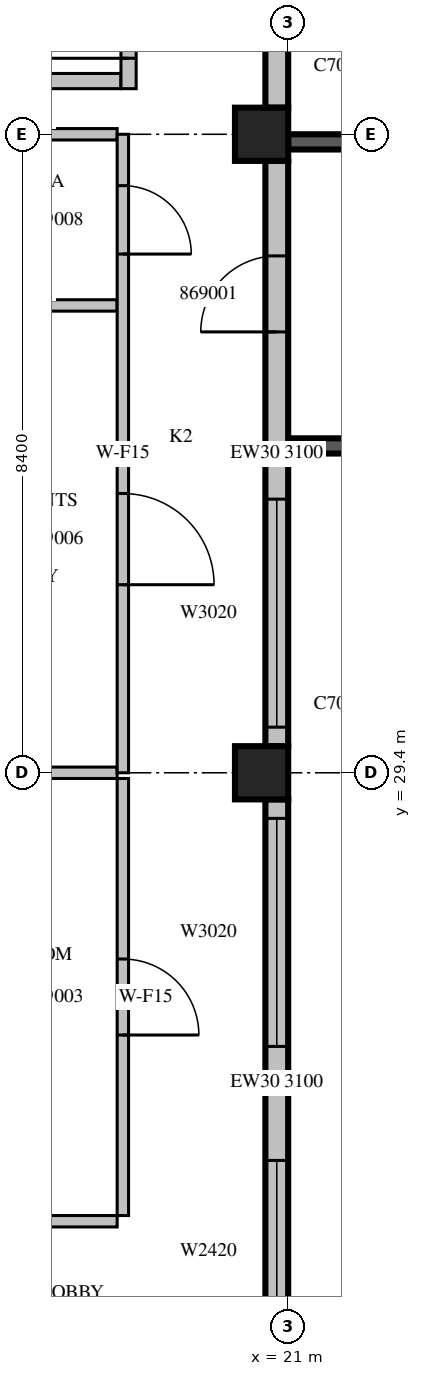
"""IFC4 building model, lengths in metres.
Left out: names, types, materials, properties, quantities, classifications, styles, units other than length and angle.
Written with IfcOpenShell. Run it as: python <this file> out.ifc"""

import sys

from ifc_helpers import new_model, si_unit, direction, frame, frame_2d, origin, origin_2d, place, context, subcontext, project, spatial, rectangle, extrude, source, transform, mapped, element, fill, save


model = new_model("IFC4")
c1 = context("Model", 3, precision=1e-05, world=origin(), true_north=direction((0.0, 1.0)))
c2 = subcontext(c1, "Body", "Model", "MODEL_VIEW")
j1 = project(units=[si_unit("LENGTHUNIT", "METRE"), si_unit("PLANEANGLEUNIT", "RADIAN")], contexts=[c1])
p1 = place(None, origin())
s1 = spatial("IfcSite", under=j1, at=p1, CompositionType="ELEMENT")
p2 = place(p1, origin())
s2 = spatial("IfcBuilding", under=s1, at=p2, CompositionType="ELEMENT")
p3 = place(p2, frame((0.0, 0.0, 302.0)))
s3 = spatial("IfcBuildingStorey", under=s2, at=p3, CompositionType="ELEMENT", Elevation=302.0)
m1 = source(origin(), c2, "Body", "SweptSolid", [
    extrude(rectangle(XDim=0.7, YDim=0.7, at=origin_2d()), origin(), (0.0, 0.0, 1.0), 3.5),
])
for number, where, z_axis, x_axis in (
    (1, (20.65, 29.4, 0.0), (0.0, 0.0, 1.0), (1.0, 0.0, 0.0)),
    (2, (20.65, 37.8, 0.0), (0.0, 0.0, 1.0), (1.0, 0.0, 0.0)),
):
    element("IfcColumn", number, at=place(p3, frame(where, z_axis=z_axis, x_axis=x_axis)), inside=s3, PredefinedType="COLUMN", context=c2, shape_type="MappedRepresentation", body=[
        mapped(m1, transform((0.0, 0.0, 0.0), scale=1.0)),
    ])
m2 = source(origin(), c2, "Body", "SweptSolid", [
    extrude(rectangle(XDim=3.9, YDim=0.2, at=frame_2d((1.95, 0.0))), origin(), (0.0, 0.0, 1.0), 3.1),
])
p4 = place(p3, frame((21.0, 33.7, 0.0), z_axis=(0.0, 0.0, 1.0), x_axis=(1.0, 0.0, 0.0)))
e3 = element("IfcWall", 3, at=p4, inside=s3, PredefinedType="SOLIDWALL", context=c2, shape_type="MappedRepresentation", body=[
    mapped(m2, transform((0.0, 0.0, 0.0), scale=1.0)),
])
m3 = source(origin(), c2, "Body", "SweptSolid", [
    extrude(rectangle(XDim=2.4, YDim=2.0, at=frame_2d((1.2, 1.0))), frame((0.0, 0.11, 0.0), z_axis=(0.0, -1.0, 0.0), x_axis=(1.0, 0.0, 0.0)), (0.0, 0.0, 1.0), 0.22),
])
p5 = place(p4, frame((0.75, 0.0, 0.6)))
e4 = element("IfcOpeningElement", 4, at=p5, cuts=e3, PredefinedType="OPENING", context=c2, shape_type="MappedRepresentation", body=[
    mapped(m3, transform((0.0, 0.0, 0.0), scale=1.0)),
])
p6 = place(p3, frame((21.0, 37.7, 0.0), z_axis=(0.0, 0.0, 1.0), x_axis=(1.0, 0.0, 0.0)))
e5 = element("IfcWall", 5, at=p6, inside=s3, PredefinedType="SOLIDWALL", context=c2, shape_type="MappedRepresentation", body=[
    mapped(m2, transform((0.0, 0.0, 0.0), scale=1.0)),
])
p7 = place(p6, frame((0.75, 0.0, 0.6)))
e6 = element("IfcOpeningElement", 6, at=p7, cuts=e5, PredefinedType="OPENING", context=c2, shape_type="MappedRepresentation", body=[
    mapped(m3, transform((0.0, 0.0, 0.0), scale=1.0)),
])
m4 = source(origin(), c2, "Body", "SweptSolid", [
    extrude(rectangle(XDim=7.45, YDim=0.3, at=frame_2d((3.725, 0.0))), origin(), (0.0, 0.0, 1.0), 3.1),
])
p8 = place(p3, frame((20.85, 21.6, 0.0), z_axis=(0.0, 0.0, 1.0), x_axis=(0.0, 1.0, 0.0)))
e7 = element("IfcWall", 7, at=p8, inside=s3, PredefinedType="STANDARD", context=c2, shape_type="MappedRepresentation", body=[
    mapped(m4, transform((0.0, 0.0, 0.0), scale=1.0)),
])
m5 = source(origin(), c2, "Body", "SweptSolid", [
    extrude(rectangle(XDim=2.4, YDim=2.0, at=frame_2d((1.2, 1.0))), frame((0.0, 0.16, 0.0), z_axis=(0.0, -1.0, 0.0), x_axis=(1.0, 0.0, 0.0)), (0.0, 0.0, 1.0), 0.32),
])
p9 = place(p8, frame((0.3, 0.0, 0.6)))
e8 = element("IfcOpeningElement", 8, at=p9, cuts=e7, PredefinedType="OPENING", context=c2, shape_type="MappedRepresentation", body=[
    mapped(m5, transform((0.0, 0.0, 0.0), scale=1.0)),
])
m6 = source(origin(), c2, "Body", "SweptSolid", [
    extrude(rectangle(XDim=3.0, YDim=2.0, at=frame_2d((1.5, 1.0))), frame((0.0, 0.16, 0.0), z_axis=(0.0, -1.0, 0.0), x_axis=(1.0, 0.0, 0.0)), (0.0, 0.0, 1.0), 0.32),
])
p10 = place(p8, frame((4.2, 0.0, 0.6)))
e9 = element("IfcOpeningElement", 9, at=p10, cuts=e7, PredefinedType="OPENING", context=c2, shape_type="MappedRepresentation", body=[
    mapped(m6, transform((0.0, 0.0, 0.0), scale=1.0)),
])
m7 = source(origin(), c2, "Body", "SweptSolid", [
    extrude(rectangle(XDim=7.7, YDim=0.3, at=frame_2d((3.85, 0.0))), origin(), (0.0, 0.0, 1.0), 3.1),
])
p11 = place(p3, frame((20.85, 29.75, 0.0), z_axis=(0.0, 0.0, 1.0), x_axis=(0.0, 1.0, 0.0)))
e10 = element("IfcWall", 10, at=p11, inside=s3, PredefinedType="STANDARD", context=c2, shape_type="MappedRepresentation", body=[
    mapped(m7, transform((0.0, 0.0, 0.0), scale=1.0)),
])
p12 = place(p11, frame((0.25, 0.0, 0.6)))
e11 = element("IfcOpeningElement", 11, at=p12, cuts=e10, PredefinedType="OPENING", context=c2, shape_type="MappedRepresentation", body=[
    mapped(m6, transform((0.0, 0.0, 0.0), scale=1.0)),
])
m8 = source(origin(), c2, "Body", "SweptSolid", [
    extrude(rectangle(XDim=1.0, YDim=2.1, at=frame_2d((0.5, 1.05))), frame((0.0, 0.16, 0.0), z_axis=(0.0, -1.0, 0.0), x_axis=(1.0, 0.0, 0.0)), (0.0, 0.0, 1.0), 0.32),
])
p13 = place(p11, frame((5.45, 0.0, 0.0)))
e12 = element("IfcOpeningElement", 12, at=p13, cuts=e10, PredefinedType="OPENING", context=c2, shape_type="MappedRepresentation", body=[
    mapped(m8, transform((0.0, 0.0, 0.0), scale=1.0)),
])
m9 = source(origin(), c2, "Body", "SweptSolid", [
    extrude(rectangle(XDim=5.53, YDim=0.3, at=frame_2d((2.765, 0.0))), origin(), (0.0, 0.0, 1.0), 3.1),
])
p14 = place(p3, frame((20.85, 38.15, 0.0), z_axis=(0.0, 0.0, 1.0), x_axis=(0.0, 1.0, 0.0)))
e13 = element("IfcWall", 13, at=p14, inside=s3, PredefinedType="STANDARD", context=c2, shape_type="MappedRepresentation", body=[
    mapped(m9, transform((0.0, 0.0, 0.0), scale=1.0)),
])
m10 = source(origin(), c2, "Body", "SweptSolid", [
    extrude(rectangle(XDim=3.6, YDim=2.0, at=frame_2d((1.8, 1.0))), frame((0.0, 0.16, 0.0), z_axis=(0.0, -1.0, 0.0), x_axis=(1.0, 0.0, 0.0)), (0.0, 0.0, 1.0), 0.32),
])
p15 = place(p14, frame((0.79, 0.0, 0.6)))
e14 = element("IfcOpeningElement", 14, at=p15, cuts=e13, PredefinedType="OPENING", context=c2, shape_type="MappedRepresentation", body=[
    mapped(m10, transform((0.0, 0.0, 0.0), scale=1.0)),
])
m11 = source(origin(), c2, "Body", "SweptSolid", [
    extrude(rectangle(XDim=8.0, YDim=0.2, at=frame_2d((4.0, 0.0))), origin(), (0.0, 0.0, 1.0), 3.1),
])
p16 = place(p3, frame((10.8, 38.5, 0.0), z_axis=(0.0, 0.0, 1.0), x_axis=(1.0, 0.0, 0.0)))
e15 = element("IfcWall", 15, at=p16, inside=s3, PredefinedType="PARTITIONING", context=c2, shape_type="MappedRepresentation", body=[
    mapped(m11, transform((0.0, 0.0, 0.0), scale=1.0)),
])
m12 = source(origin(), c2, "Body", "SweptSolid", [
    extrude(rectangle(XDim=5.45, YDim=0.2, at=frame_2d((2.725, 0.0))), origin(), (0.0, 0.0, 1.0), 3.1),
])
p17 = place(p3, frame((18.9, 38.4, 0.0), z_axis=(0.0, 0.0, 1.0), x_axis=(0.0, 1.0, 0.0)))
e16 = element("IfcWall", 16, at=p17, inside=s3, PredefinedType="PARTITIONING", context=c2, shape_type="MappedRepresentation", body=[
    mapped(m12, transform((0.0, 0.0, 0.0), scale=1.0)),
])
m13 = source(origin(), c2, "Body", "SweptSolid", [
    extrude(rectangle(XDim=1.2, YDim=2.1, at=frame_2d((0.6, 1.05))), frame((0.0, 0.11, 0.0), z_axis=(0.0, -1.0, 0.0), x_axis=(1.0, 0.0, 0.0)), (0.0, 0.0, 1.0), 0.22),
])
p18 = place(p17, frame((0.4, 0.0, 0.0)))
e17 = element("IfcOpeningElement", 17, at=p18, cuts=e16, PredefinedType="OPENING", context=c2, shape_type="MappedRepresentation", body=[
    mapped(m13, transform((0.0, 0.0, 0.0), scale=1.0)),
])
m14 = source(origin(), c2, "Body", "SweptSolid", [
    extrude(rectangle(XDim=0.9, YDim=2.1, at=frame_2d((0.45, 1.05))), frame((0.0, 0.11, 0.0), z_axis=(0.0, -1.0, 0.0), x_axis=(1.0, 0.0, 0.0)), (0.0, 0.0, 1.0), 0.22),
])
p19 = place(p17, frame((3.25, 0.0, 0.0)))
e18 = element("IfcOpeningElement", 18, at=p19, cuts=e16, PredefinedType="OPENING", context=c2, shape_type="MappedRepresentation", body=[
    mapped(m14, transform((0.0, 0.0, 0.0), scale=1.0)),
])
m15 = source(origin(), c2, "Body", "SweptSolid", [
    extrude(rectangle(XDim=4.575, YDim=0.15, at=frame_2d((2.288, 0.0))), origin(), (0.0, 0.0, 1.0), 3.1),
])
for number, where, z_axis, x_axis in (
    (19, (14.175, 23.5, 0.0), (0.0, 0.0, 1.0), (1.0, 0.0, 0.0)),
    (20, (18.75, 29.4, 0.0), (0.0, 0.0, 1.0), (-1.0, 0.0, 0.0)),
):
    element("IfcWall", number, at=place(p3, frame(where, z_axis=z_axis, x_axis=x_axis)), inside=s3, PredefinedType="PARTITIONING", context=c2, shape_type="MappedRepresentation", body=[
        mapped(m15, transform((0.0, 0.0, 0.0), scale=1.0)),
    ])
m16 = source(origin(), c2, "Body", "SweptSolid", [
    extrude(rectangle(XDim=5.75, YDim=0.15, at=frame_2d((2.875, 0.0))), origin(), (0.0, 0.0, 1.0), 3.1),
])
p20 = place(p3, frame((18.825, 23.575, 0.0), z_axis=(0.0, 0.0, 1.0), x_axis=(0.0, 1.0, 0.0)))
e21 = element("IfcWall", 21, at=p20, inside=s3, PredefinedType="PARTITIONING", context=c2, shape_type="MappedRepresentation", body=[
    mapped(m16, transform((0.0, 0.0, 0.0), scale=1.0)),
])
m17 = source(origin(), c2, "Body", "SweptSolid", [
    extrude(rectangle(XDim=1.0, YDim=2.1, at=frame_2d((0.5, 1.05))), frame((0.0, 0.085, 0.0), z_axis=(0.0, -1.0, 0.0), x_axis=(1.0, 0.0, 0.0)), (0.0, 0.0, 1.0), 0.17),
])
p21 = place(p20, frame((2.375, 0.0, 0.0)))
e22 = element("IfcOpeningElement", 22, at=p21, cuts=e21, PredefinedType="OPENING", context=c2, shape_type="MappedRepresentation", body=[
    mapped(m17, transform((0.0, 0.0, 0.0), scale=1.0)),
])
m18 = source(origin(), c2, "Body", "SweptSolid", [
    extrude(rectangle(XDim=2.4, YDim=0.15, at=frame_2d((1.2, 0.0))), origin(), (0.0, 0.0, 1.0), 3.1),
])
for number, where, z_axis, x_axis in (
    (23, (18.75, 35.548, 0.0), (0.0, 0.0, 1.0), (-1.0, 0.0, 0.0)),
    (24, (18.75, 37.8, 0.0), (0.0, 0.0, 1.0), (-1.0, 0.0, 0.0)),
):
    element("IfcWall", number, at=place(p3, frame(where, z_axis=z_axis, x_axis=x_axis)), inside=s3, PredefinedType="PARTITIONING", context=c2, shape_type="MappedRepresentation", body=[
        mapped(m18, transform((0.0, 0.0, 0.0), scale=1.0)),
    ])
m19 = source(origin(), c2, "Body", "SweptSolid", [
    extrude(rectangle(XDim=8.4, YDim=0.15, at=frame_2d((4.2, 0.0))), origin(), (0.0, 0.0, 1.0), 3.1),
])
p22 = place(p3, frame((18.825, 29.4, 0.0), z_axis=(0.0, 0.0, 1.0), x_axis=(0.0, 1.0, 0.0)))
e25 = element("IfcWall", 25, at=p22, inside=s3, PredefinedType="PARTITIONING", context=c2, shape_type="MappedRepresentation", body=[
    mapped(m19, transform((0.0, 0.0, 0.0), scale=1.0)),
])
m20 = source(origin(), c2, "Body", "SweptSolid", [
    extrude(rectangle(XDim=1.2, YDim=2.1, at=frame_2d((0.6, 1.05))), frame((0.0, 0.085, 0.0), z_axis=(0.0, -1.0, 0.0), x_axis=(1.0, 0.0, 0.0)), (0.0, 0.0, 1.0), 0.17),
])
p23 = place(p22, frame((2.474, 0.0, 0.0)))
e26 = element("IfcOpeningElement", 26, at=p23, cuts=e25, PredefinedType="OPENING", context=c2, shape_type="MappedRepresentation", body=[
    mapped(m20, transform((0.0, 0.0, 0.0), scale=1.0)),
])
m21 = source(origin(), c2, "Body", "SweptSolid", [
    extrude(rectangle(XDim=0.9, YDim=2.1, at=frame_2d((0.45, 1.05))), frame((0.0, 0.085, 0.0), z_axis=(0.0, -1.0, 0.0), x_axis=(1.0, 0.0, 0.0)), (0.0, 0.0, 1.0), 0.17),
])
p24 = place(p22, frame((6.824, 0.0, 0.0)))
e27 = element("IfcOpeningElement", 27, at=p24, cuts=e25, PredefinedType="OPENING", context=c2, shape_type="MappedRepresentation", body=[
    mapped(m21, transform((0.0, 0.0, 0.0), scale=1.0)),
])
m22 = source(origin(), c2, "Body", "SweptSolid", [
    extrude(rectangle(XDim=2.4, YDim=2.0, at=frame_2d((1.2, 1.0))), frame((0.0, 0.03, 0.0), z_axis=(0.0, -1.0, 0.0), x_axis=(1.0, 0.0, 0.0)), (0.0, 0.0, 1.0), 0.06),
])
p25 = place(p9, origin())
e28 = element("IfcWindow", 28, at=p25, inside=s3, PartitioningType="SINGLE_PANEL", PredefinedType="WINDOW", context=c2, shape_type="MappedRepresentation", body=[
    mapped(m22, transform((0.0, 0.0, 0.0), scale=1.0)),
])
fill(e8, e28)
m23 = source(origin(), c2, "Body", "SweptSolid", [
    extrude(rectangle(XDim=3.0, YDim=2.0, at=frame_2d((1.5, 1.0))), frame((0.0, 0.03, 0.0), z_axis=(0.0, -1.0, 0.0), x_axis=(1.0, 0.0, 0.0)), (0.0, 0.0, 1.0), 0.06),
])
p26 = place(p10, origin())
e29 = element("IfcWindow", 29, at=p26, inside=s3, PartitioningType="SINGLE_PANEL", PredefinedType="WINDOW", context=c2, shape_type="MappedRepresentation", body=[
    mapped(m23, transform((0.0, 0.0, 0.0), scale=1.0)),
])
fill(e9, e29)
p27 = place(p12, origin())
e30 = element("IfcWindow", 30, at=p27, inside=s3, PartitioningType="SINGLE_PANEL", PredefinedType="WINDOW", context=c2, shape_type="MappedRepresentation", body=[
    mapped(m23, transform((0.0, 0.0, 0.0), scale=1.0)),
])
fill(e11, e30)
m24 = source(origin(), c2, "Body", "SweptSolid", [
    extrude(rectangle(XDim=1.2, YDim=2.1, at=frame_2d((0.6, 1.05))), frame((0.0, 0.025, 0.0), z_axis=(0.0, -1.0, 0.0), x_axis=(1.0, 0.0, 0.0)), (0.0, 0.0, 1.0), 0.05),
])
p28 = place(p18, origin())
e31 = element("IfcDoor", 31, at=p28, inside=s3, OperationType="SINGLE_SWING_LEFT", PredefinedType="DOOR", context=c2, shape_type="MappedRepresentation", body=[
    mapped(m24, transform((0.0, 0.0, 0.0), scale=1.0)),
])
fill(e17, e31)
m25 = source(origin(), c2, "Body", "SweptSolid", [
    extrude(rectangle(XDim=1.0, YDim=2.1, at=frame_2d((0.5, 1.05))), frame((0.0, 0.025, 0.0), z_axis=(0.0, -1.0, 0.0), x_axis=(1.0, 0.0, 0.0)), (0.0, 0.0, 1.0), 0.05),
])
p29 = place(p21, origin())
e32 = element("IfcDoor", 32, at=p29, inside=s3, OperationType="SINGLE_SWING_RIGHT", PredefinedType="DOOR", context=c2, shape_type="MappedRepresentation", body=[
    mapped(m25, transform((0.0, 0.0, 0.0), scale=1.0)),
])
fill(e22, e32)
p30 = place(p23, origin())
e33 = element("IfcDoor", 33, at=p30, inside=s3, OperationType="SINGLE_SWING_RIGHT", PredefinedType="DOOR", context=c2, shape_type="MappedRepresentation", body=[
    mapped(m24, transform((0.0, 0.0, 0.0), scale=1.0)),
])
fill(e26, e33)
m26 = source(origin(), c2, "Body", "SweptSolid", [
    extrude(rectangle(XDim=0.9, YDim=2.1, at=frame_2d((0.45, 1.05))), frame((0.0, 0.025, 0.0), z_axis=(0.0, -1.0, 0.0), x_axis=(1.0, 0.0, 0.0)), (0.0, 0.0, 1.0), 0.05),
])
p31 = place(p24, origin())
e34 = element("IfcDoor", 34, at=p31, inside=s3, OperationType="SINGLE_SWING_RIGHT", PredefinedType="DOOR", context=c2, shape_type="MappedRepresentation", body=[
    mapped(m26, transform((0.0, 0.0, 0.0), scale=1.0)),
])
fill(e27, e34)
p32 = place(p13, origin())
e35 = element("IfcDoor", 35, at=p32, inside=s3, OperationType="SINGLE_SWING_LEFT", PredefinedType="DOOR", context=c2, shape_type="MappedRepresentation", body=[
    mapped(m25, transform((0.0, 0.0, 0.0), scale=1.0)),
])
fill(e12, e35)
save(model, sys.argv[1])
